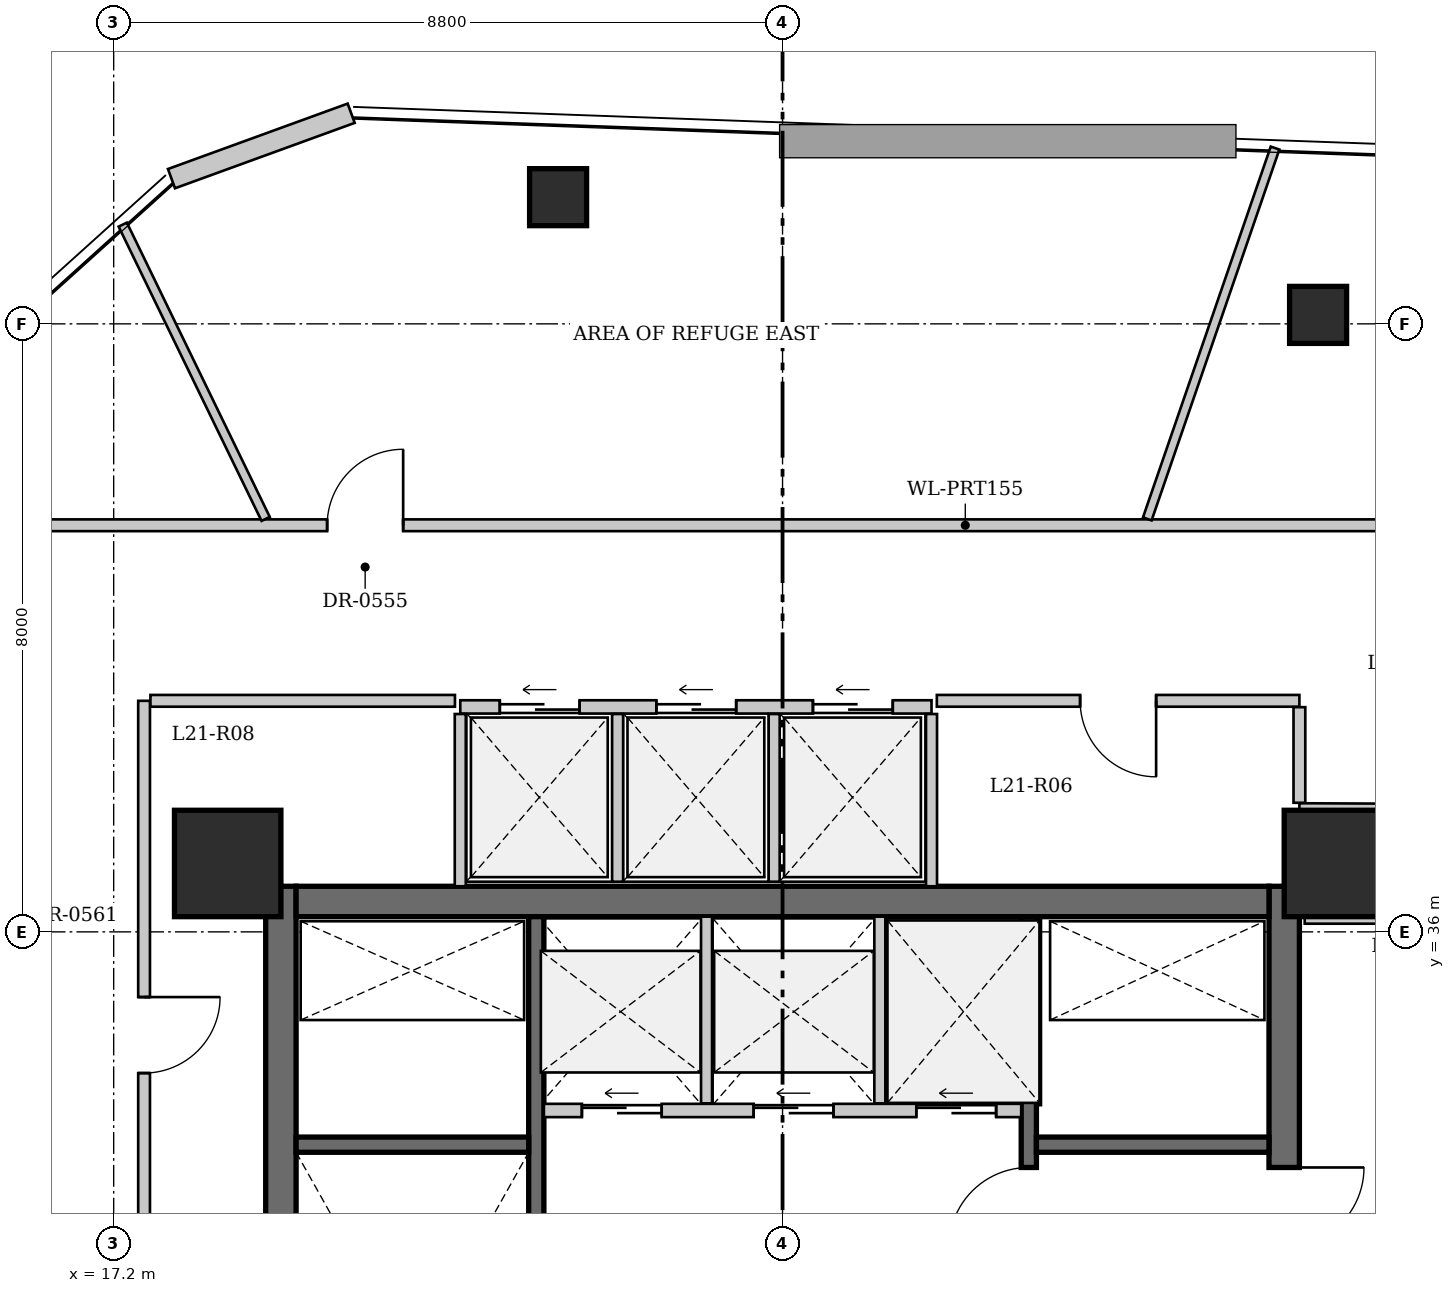
"""IFC4 building model, lengths in metres.
Left out: names, types, materials, properties, quantities, classifications, styles, units other than length and angle.
Written with IfcOpenShell. Run it as: python <this file> out.ifc"""

import sys

from ifc_helpers import new_model, si_unit, direction, frame, frame_2d, origin, origin_2d, place, context, subcontext, project, spatial, rectangle, hollow_rectangle, extrude, source, transform, mapped, element, fill, save


model = new_model("IFC4")
c1 = context("Model", 3, precision=1e-05, world=origin(), true_north=direction((0.0, 1.0)))
c2 = subcontext(c1, "Body", "Model", "MODEL_VIEW")
j1 = project(units=[si_unit("LENGTHUNIT", "METRE"), si_unit("PLANEANGLEUNIT", "RADIAN")], contexts=[c1])
p1 = place(None, origin())
s1 = spatial("IfcSite", under=j1, at=p1, CompositionType="ELEMENT")
p2 = place(p1, origin())
s2 = spatial("IfcBuilding", under=s1, at=p2, CompositionType="ELEMENT")
p3 = place(p2, frame((0.0, 0.0, 84.8)))
s3 = spatial("IfcBuildingStorey", under=s2, at=p3, CompositionType="ELEMENT", Elevation=84.8)
for number, where, z_axis, x_axis in (
    (1, (23.047, 45.667, 0.0), (0.0, 0.0, 1.0), (1.0, 0.0, 0.0)),
    (2, (33.046, 44.118, 0.0), (0.0, 0.0, 1.0), (1.0, 0.0, 0.0)),
):
    element("IfcColumn", number, at=place(p3, frame(where, z_axis=z_axis, x_axis=x_axis)), inside=s3, PredefinedType="COLUMN", context=c2, shape_type="SweptSolid", body=[
        extrude(hollow_rectangle(XDim=0.75, YDim=0.75, WallThickness=0.04, at=origin_2d()), origin(), (0.0, 0.0, 1.0), 4.15),
    ])
for number, where, z_axis, x_axis in (
    (3, (33.3, 36.9, 0.0), (0.0, 0.0, 1.0), (1.0, 0.0, 0.0)),
    (4, (18.7, 36.9, 0.0), (0.0, 0.0, 1.0), (1.0, 0.0, 0.0)),
):
    element("IfcColumn", number, at=place(p3, frame(where, z_axis=z_axis, x_axis=x_axis)), inside=s3, PredefinedType="COLUMN", context=c2, shape_type="SweptSolid", body=[
        extrude(rectangle(XDim=1.4, YDim=1.4, at=origin_2d()), origin(), (0.0, 0.0, 1.0), 4.15),
    ])
p4 = place(p3, frame((17.96, 45.911, 0.0), z_axis=(0.0, 0.0, 1.0), x_axis=(0.939714067994, 0.341961211856, 0.0)))
e5 = element("IfcWall", 5, at=p4, inside=s3, PredefinedType="SOLIDWALL", context=c2, shape_type="SweptSolid", body=[
    extrude(rectangle(XDim=2.516, YDim=0.27, at=frame_2d((1.258, 0.0))), origin(), (0.0, 0.0, 1.0), 4.15),
])
p5 = place(p3, frame((19.4, 25.8, 0.0), z_axis=(0.0, 0.0, 1.0), x_axis=(0.0, 1.0, 0.0)))
e6 = element("IfcWall", 6, at=p5, inside=s3, PredefinedType="SHEAR", context=c2, shape_type="SweptSolid", body=[
    extrude(rectangle(XDim=10.8, YDim=0.4, at=frame_2d((5.4, 0.0))), origin(), (0.0, 0.0, 1.0), 4.6),
])
p6 = place(p3, frame((32.6, 36.6, 0.0), z_axis=(0.0, 0.0, 1.0), x_axis=(0.0, -1.0, 0.0)))
e7 = element("IfcWall", 7, at=p6, inside=s3, PredefinedType="SHEAR", context=c2, shape_type="SweptSolid", body=[
    extrude(rectangle(XDim=10.8, YDim=0.4, at=frame_2d((5.4, 0.0))), origin(), (0.0, 0.0, 1.0), 4.6),
])
p7 = place(p6, frame((3.7, 0.0, 0.0)))
e8 = element("IfcOpeningElement", 8, at=p7, cuts=e7, PredefinedType="OPENING", context=c2, shape_type="SweptSolid", body=[
    extrude(rectangle(XDim=1.05, YDim=2.15, at=frame_2d((0.525, 1.075))), frame((0.0, 0.21, 0.0), z_axis=(0.0, -1.0, 0.0), x_axis=(1.0, 0.0, 0.0)), (0.0, 0.0, 1.0), 0.42),
])
p8 = place(p3, frame((19.6, 36.4, 0.0), z_axis=(0.0, 0.0, 1.0), x_axis=(1.0, 0.0, 0.0)))
e9 = element("IfcWall", 9, at=p8, inside=s3, PredefinedType="SHEAR", context=c2, shape_type="SweptSolid", body=[
    extrude(rectangle(XDim=12.8, YDim=0.4, at=frame_2d((6.4, 0.0))), origin(), (0.0, 0.0, 1.0), 4.6),
])
p9 = place(p3, frame((22.76, 26.2, 0.0), z_axis=(0.0, 0.0, 1.0), x_axis=(0.0, 1.0, 0.0)))
e10 = element("IfcWall", 10, at=p9, inside=s3, PredefinedType="SHEAR", context=c2, shape_type="SweptSolid", body=[
    extrude(rectangle(XDim=10.0, YDim=0.2, at=frame_2d((5.0, 0.0))), origin(), (0.0, 0.0, 1.0), 4.6),
])
p10 = place(p3, frame((29.24, 26.2, 0.0), z_axis=(0.0, 0.0, 1.0), x_axis=(0.0, 1.0, 0.0)))
e11 = element("IfcWall", 11, at=p10, inside=s3, PredefinedType="SHEAR", context=c2, shape_type="SweptSolid", body=[
    extrude(rectangle(XDim=10.0, YDim=0.2, at=frame_2d((5.0, 0.0))), origin(), (0.0, 0.0, 1.0), 4.6),
])
p11 = place(p10, frame((5.65, 0.0, 0.0)))
e12 = element("IfcOpeningElement", 12, at=p11, cuts=e11, PredefinedType="OPENING", context=c2, shape_type="SweptSolid", body=[
    extrude(rectangle(XDim=1.05, YDim=2.15, at=frame_2d((0.525, 1.075))), frame((0.0, 0.11, 0.0), z_axis=(0.0, -1.0, 0.0), x_axis=(1.0, 0.0, 0.0)), (0.0, 0.0, 1.0), 0.22),
])
for number, where, z_axis, x_axis in (
    (13, (19.6, 33.2, 0.0), (0.0, 0.0, 1.0), (1.0, 0.0, 0.0)),
    (14, (29.34, 33.2, 0.0), (0.0, 0.0, 1.0), (1.0, 0.0, 0.0)),
):
    element("IfcWall", number, at=place(p3, frame(where, z_axis=z_axis, x_axis=x_axis)), inside=s3, PredefinedType="SHEAR", context=c2, shape_type="SweptSolid", body=[
        extrude(rectangle(XDim=3.06, YDim=0.2, at=frame_2d((1.53, 0.0))), origin(), (0.0, 0.0, 1.0), 4.6),
    ])
p12 = place(p3, frame((22.86, 33.65, 0.0), z_axis=(0.0, 0.0, 1.0), x_axis=(1.0, 0.0, 0.0)))
e15 = element("IfcWall", 15, at=p12, inside=s3, PredefinedType="SOLIDWALL", context=c2, shape_type="SweptSolid", body=[
    extrude(rectangle(XDim=6.28, YDim=0.175, at=frame_2d((3.14, 0.0))), origin(), (0.0, 0.0, 1.0), 4.15),
])
p13 = place(p12, frame((0.5, 0.0, 0.0)))
e16 = element("IfcOpeningElement", 16, at=p13, cuts=e15, PredefinedType="OPENING", context=c2, shape_type="SweptSolid", body=[
    extrude(rectangle(XDim=1.05, YDim=2.15, at=frame_2d((0.525, 1.075))), frame((0.0, 0.098, 0.0), z_axis=(0.0, -1.0, 0.0), x_axis=(1.0, 0.0, 0.0)), (0.0, 0.0, 1.0), 0.195),
])
p14 = place(p12, frame((2.76, 0.0, 0.0)))
e17 = element("IfcOpeningElement", 17, at=p14, cuts=e15, PredefinedType="OPENING", context=c2, shape_type="SweptSolid", body=[
    extrude(rectangle(XDim=1.05, YDim=2.15, at=frame_2d((0.525, 1.075))), frame((0.0, 0.098, 0.0), z_axis=(0.0, -1.0, 0.0), x_axis=(1.0, 0.0, 0.0)), (0.0, 0.0, 1.0), 0.195),
])
p15 = place(p12, frame((4.9, 0.0, 0.0)))
e18 = element("IfcOpeningElement", 18, at=p15, cuts=e15, PredefinedType="OPENING", context=c2, shape_type="SweptSolid", body=[
    extrude(rectangle(XDim=1.05, YDim=2.15, at=frame_2d((0.525, 1.075))), frame((0.0, 0.098, 0.0), z_axis=(0.0, -1.0, 0.0), x_axis=(1.0, 0.0, 0.0)), (0.0, 0.0, 1.0), 0.195),
])
for number, where, z_axis, x_axis in (
    (19, (25.0, 33.743, 0.0), (0.0, 0.0, 1.0), (0.0, 1.0, 0.0)),
    (20, (27.28, 33.743, 0.0), (0.0, 0.0, 1.0), (0.0, 1.0, 0.0)),
):
    element("IfcWall", number, at=place(p3, frame(where, z_axis=z_axis, x_axis=x_axis)), inside=s3, PredefinedType="SOLIDWALL", context=c2, shape_type="SweptSolid", body=[
        extrude(rectangle(XDim=2.457, YDim=0.145, at=frame_2d((1.228, 0.0))), origin(), (0.0, 0.0, 1.0), 4.15),
    ])
p16 = place(p3, frame((21.76, 38.96, 0.0), z_axis=(0.0, 0.0, 1.0), x_axis=(1.0, 0.0, 0.0)))
e21 = element("IfcWall", 21, at=p16, inside=s3, PredefinedType="SOLIDWALL", context=c2, shape_type="SweptSolid", body=[
    extrude(rectangle(XDim=6.2, YDim=0.175, at=frame_2d((3.1, 0.0))), origin(), (0.0, 0.0, 1.0), 4.15),
])
p17 = place(p16, frame((0.52, 0.0, 0.0)))
e22 = element("IfcOpeningElement", 22, at=p17, cuts=e21, PredefinedType="OPENING", context=c2, shape_type="SweptSolid", body=[
    extrude(rectangle(XDim=1.05, YDim=2.15, at=frame_2d((0.525, 1.075))), frame((0.0, 0.098, 0.0), z_axis=(0.0, -1.0, 0.0), x_axis=(1.0, 0.0, 0.0)), (0.0, 0.0, 1.0), 0.195),
])
p18 = place(p16, frame((2.58, 0.0, 0.0)))
e23 = element("IfcOpeningElement", 23, at=p18, cuts=e21, PredefinedType="OPENING", context=c2, shape_type="SweptSolid", body=[
    extrude(rectangle(XDim=1.05, YDim=2.15, at=frame_2d((0.525, 1.075))), frame((0.0, 0.098, 0.0), z_axis=(0.0, -1.0, 0.0), x_axis=(1.0, 0.0, 0.0)), (0.0, 0.0, 1.0), 0.195),
])
p19 = place(p16, frame((4.64, 0.0, 0.0)))
e24 = element("IfcOpeningElement", 24, at=p19, cuts=e21, PredefinedType="OPENING", context=c2, shape_type="SweptSolid", body=[
    extrude(rectangle(XDim=1.05, YDim=2.15, at=frame_2d((0.525, 1.075))), frame((0.0, 0.098, 0.0), z_axis=(0.0, -1.0, 0.0), x_axis=(1.0, 0.0, 0.0)), (0.0, 0.0, 1.0), 0.195),
])
for number, where, z_axis, x_axis in (
    (25, (21.76, 36.6, 0.0), (0.0, 0.0, 1.0), (0.0, 1.0, 0.0)),
    (26, (27.96, 36.6, 0.0), (0.0, 0.0, 1.0), (0.0, 1.0, 0.0)),
):
    element("IfcWall", number, at=place(p3, frame(where, z_axis=z_axis, x_axis=x_axis)), inside=s3, PredefinedType="SOLIDWALL", context=c2, shape_type="SweptSolid", body=[
        extrude(rectangle(XDim=2.266, YDim=0.145, at=frame_2d((1.133, 0.0))), origin(), (0.0, 0.0, 1.0), 4.15),
    ])
for number, where, z_axis, x_axis in (
    (27, (23.83, 36.66, 0.0), (0.0, 0.0, 1.0), (0.0, 1.0, 0.0)),
    (28, (25.89, 36.66, 0.0), (0.0, 0.0, 1.0), (0.0, 1.0, 0.0)),
):
    element("IfcWall", number, at=place(p3, frame(where, z_axis=z_axis, x_axis=x_axis)), inside=s3, PredefinedType="SOLIDWALL", context=c2, shape_type="SweptSolid", body=[
        extrude(rectangle(XDim=2.207, YDim=0.145, at=frame_2d((1.103, 0.0))), origin(), (0.0, 0.0, 1.0), 4.15),
    ])
p20 = place(p3, frame((15.2, 41.35, 0.0), z_axis=(0.0, 0.0, 1.0), x_axis=(1.0, 0.0, 0.0)))
e29 = element("IfcWall", 29, at=p20, inside=s3, PredefinedType="PARTITIONING", context=c2, shape_type="SweptSolid", body=[
    extrude(rectangle(XDim=20.6, YDim=0.155, at=frame_2d((10.3, 0.0))), origin(), (0.0, 0.0, 1.0), 4.15),
])
p21 = place(p20, frame((4.809, 0.0, 0.0)))
e30 = element("IfcOpeningElement", 30, at=p21, cuts=e29, PredefinedType="OPENING", context=c2, shape_type="SweptSolid", body=[
    extrude(rectangle(XDim=1.0, YDim=2.15, at=frame_2d((0.5, 1.075))), frame((0.0, 0.087, 0.0), z_axis=(0.0, -1.0, 0.0), x_axis=(1.0, 0.0, 0.0)), (0.0, 0.0, 1.0), 0.175),
])
p22 = place(p3, frame((32.8, 39.04, 0.0), z_axis=(0.0, 0.0, 1.0), x_axis=(-1.0, 0.0, 0.0)))
e31 = element("IfcWall", 31, at=p22, inside=s3, PredefinedType="PARTITIONING", context=c2, shape_type="SweptSolid", body=[
    extrude(rectangle(XDim=4.77, YDim=0.155, at=frame_2d((2.385, 0.0))), origin(), (0.0, 0.0, 1.0), 4.15),
])
p23 = place(p22, frame((1.885, 0.0, 0.0)))
e32 = element("IfcOpeningElement", 32, at=p23, cuts=e31, PredefinedType="OPENING", context=c2, shape_type="SweptSolid", body=[
    extrude(rectangle(XDim=1.0, YDim=2.15, at=frame_2d((0.5, 1.075))), frame((0.0, 0.087, 0.0), z_axis=(0.0, -1.0, 0.0), x_axis=(1.0, 0.0, 0.0)), (0.0, 0.0, 1.0), 0.175),
])
p24 = place(p3, frame((17.6, 39.04, 0.0), z_axis=(0.0, 0.0, 1.0), x_axis=(0.0, -1.0, 0.0)))
e33 = element("IfcWall", 33, at=p24, inside=s3, PredefinedType="PARTITIONING", context=c2, shape_type="SweptSolid", body=[
    extrude(rectangle(XDim=13.24, YDim=0.155, at=frame_2d((6.62, 0.0))), origin(), (0.0, 0.0, 1.0), 4.15),
])
p25 = place(p24, frame((3.898, 0.0, 0.0)))
e34 = element("IfcOpeningElement", 34, at=p25, cuts=e33, PredefinedType="OPENING", context=c2, shape_type="SweptSolid", body=[
    extrude(rectangle(XDim=1.0, YDim=2.15, at=frame_2d((0.5, 1.075))), frame((0.0, 0.087, 0.0), z_axis=(0.0, -1.0, 0.0), x_axis=(1.0, 0.0, 0.0)), (0.0, 0.0, 1.0), 0.175),
])
p26 = place(p24, frame((10.374, 0.0, 0.0)))
e35 = element("IfcOpeningElement", 35, at=p26, cuts=e33, PredefinedType="OPENING", context=c2, shape_type="SweptSolid", body=[
    extrude(rectangle(XDim=1.0, YDim=2.15, at=frame_2d((0.5, 1.075))), frame((0.0, 0.087, 0.0), z_axis=(0.0, -1.0, 0.0), x_axis=(1.0, 0.0, 0.0)), (0.0, 0.0, 1.0), 0.175),
])
p27 = place(p3, frame((33.928, 37.61, 0.0), z_axis=(0.0, 0.0, 1.0), x_axis=(-0.999989669582, 0.004545407589, 0.0)))
e36 = element("IfcWall", 36, at=p27, inside=s3, PredefinedType="PARTITIONING", context=c2, shape_type="SweptSolid", body=[
    extrude(rectangle(XDim=1.128, YDim=0.155, at=frame_2d((0.564, 0.0))), origin(), (0.0, 0.0, 1.0), 2.725),
])
p28 = place(p3, frame((32.8, 37.698, 0.0), z_axis=(0.0, 0.0, 1.0), x_axis=(0.0, 1.0, 0.0)))
e37 = element("IfcWall", 37, at=p28, inside=s3, PredefinedType="PARTITIONING", context=c2, shape_type="SweptSolid", body=[
    extrude(rectangle(XDim=1.258, YDim=0.155, at=frame_2d((0.629, 0.0))), origin(), (0.0, 0.0, 1.0), 3.712),
])
p29 = place(p3, frame((21.69, 39.04, 0.0), z_axis=(0.0, 0.0, 1.0), x_axis=(-1.0, 0.0, 0.0)))
e38 = element("IfcWall", 38, at=p29, inside=s3, PredefinedType="PARTITIONING", context=c2, shape_type="SweptSolid", body=[
    extrude(rectangle(XDim=4.006, YDim=0.155, at=frame_2d((2.003, 0.0))), origin(), (0.0, 0.0, 1.0), 4.15),
])
p30 = place(p3, frame((32.87, 36.185, 0.0), z_axis=(0.0, 0.0, 1.0), x_axis=(1.0, 0.0, 0.0)))
e39 = element("IfcWall", 39, at=p30, inside=s3, PredefinedType="PARTITIONING", context=c2, shape_type="SweptSolid", body=[
    extrude(rectangle(XDim=1.046, YDim=0.155, at=frame_2d((0.523, 0.0))), origin(), (0.0, 0.0, 1.0), 2.725),
])
p31 = place(p3, frame((30.799, 41.434, 0.0), z_axis=(0.0, 0.0, 1.0), x_axis=(0.32567865408, 0.945480520305, 0.0)))
e40 = element("IfcWall", 40, at=p31, inside=s3, PredefinedType="PARTITIONING", context=c2, shape_type="SweptSolid", body=[
    extrude(rectangle(XDim=5.16, YDim=0.12, at=frame_2d((2.58, 0.0))), origin(), (0.0, 0.0, 1.0), 4.15),
])
p32 = place(p3, frame((19.199, 41.434, 0.0), z_axis=(0.0, 0.0, 1.0), x_axis=(-0.436746607689, 0.899584571162, 0.0)))
e41 = element("IfcWall", 41, at=p32, inside=s3, PredefinedType="PARTITIONING", context=c2, shape_type="SweptSolid", body=[
    extrude(rectangle(XDim=4.304, YDim=0.12, at=frame_2d((2.152, 0.0))), origin(), (0.0, 0.0, 1.0), 4.15),
])
m1 = source(origin(), c2, "Body", "SweptSolid", [
    extrude(rectangle(XDim=1.05, YDim=2.15, at=frame_2d((0.525, 1.075))), frame((0.0, 0.025, 0.0), z_axis=(0.0, -1.0, 0.0), x_axis=(1.0, 0.0, 0.0)), (0.0, 0.0, 1.0), 0.05),
])
p33 = place(p7, origin())
e42 = element("IfcDoor", 42, at=p33, inside=s3, OperationType="SINGLE_SWING_LEFT", PredefinedType="DOOR", context=c2, shape_type="MappedRepresentation", body=[
    mapped(m1, transform((0.0, 0.0, 0.0), x_axis=(1.0, 0.0, 0.0), y_axis=(0.0, 1.0, 0.0), z_axis=(0.0, 0.0, 1.0), scale=1.0)),
])
fill(e8, e42)
p34 = place(p11, origin())
e43 = element("IfcDoor", 43, at=p34, inside=s3, OperationType="SINGLE_SWING_LEFT", PredefinedType="DOOR", context=c2, shape_type="MappedRepresentation", body=[
    mapped(m1, transform((0.0, 0.0, 0.0), x_axis=(1.0, 0.0, 0.0), y_axis=(0.0, 1.0, 0.0), z_axis=(0.0, 0.0, 1.0), scale=1.0)),
])
fill(e12, e43)
m2 = source(origin(), c2, "Body", "SweptSolid", [
    extrude(rectangle(XDim=1.05, YDim=2.15, at=frame_2d((0.525, 1.075))), frame((0.0, 0.025, 0.0), z_axis=(0.0, -1.0, 0.0), x_axis=(1.0, 0.0, 0.0)), (0.0, 0.0, 1.0), 0.05),
])
p35 = place(p13, origin())
e44 = element("IfcDoor", 44, at=p35, inside=s3, OperationType="SLIDING_TO_LEFT", PredefinedType="DOOR", context=c2, shape_type="MappedRepresentation", body=[
    mapped(m2, transform((0.0, 0.0, 0.0), x_axis=(1.0, 0.0, 0.0), y_axis=(0.0, 1.0, 0.0), z_axis=(0.0, 0.0, 1.0), scale=1.0)),
])
fill(e16, e44)
p36 = place(p14, origin())
e45 = element("IfcDoor", 45, at=p36, inside=s3, OperationType="SLIDING_TO_LEFT", PredefinedType="DOOR", context=c2, shape_type="MappedRepresentation", body=[
    mapped(m2, transform((0.0, 0.0, 0.0), x_axis=(1.0, 0.0, 0.0), y_axis=(0.0, 1.0, 0.0), z_axis=(0.0, 0.0, 1.0), scale=1.0)),
])
fill(e17, e45)
p37 = place(p15, origin())
e46 = element("IfcDoor", 46, at=p37, inside=s3, OperationType="SLIDING_TO_LEFT", PredefinedType="DOOR", context=c2, shape_type="MappedRepresentation", body=[
    mapped(m2, transform((0.0, 0.0, 0.0), x_axis=(1.0, 0.0, 0.0), y_axis=(0.0, 1.0, 0.0), z_axis=(0.0, 0.0, 1.0), scale=1.0)),
])
fill(e18, e46)
p38 = place(p17, origin())
e47 = element("IfcDoor", 47, at=p38, inside=s3, OperationType="SLIDING_TO_LEFT", PredefinedType="DOOR", context=c2, shape_type="MappedRepresentation", body=[
    mapped(m2, transform((0.0, 0.0, 0.0), x_axis=(1.0, 0.0, 0.0), y_axis=(0.0, 1.0, 0.0), z_axis=(0.0, 0.0, 1.0), scale=1.0)),
])
fill(e22, e47)
p39 = place(p18, origin())
e48 = element("IfcDoor", 48, at=p39, inside=s3, OperationType="SLIDING_TO_LEFT", PredefinedType="DOOR", context=c2, shape_type="MappedRepresentation", body=[
    mapped(m2, transform((0.0, 0.0, 0.0), x_axis=(1.0, 0.0, 0.0), y_axis=(0.0, 1.0, 0.0), z_axis=(0.0, 0.0, 1.0), scale=1.0)),
])
fill(e23, e48)
p40 = place(p19, origin())
e49 = element("IfcDoor", 49, at=p40, inside=s3, OperationType="SLIDING_TO_LEFT", PredefinedType="DOOR", context=c2, shape_type="MappedRepresentation", body=[
    mapped(m2, transform((0.0, 0.0, 0.0), x_axis=(1.0, 0.0, 0.0), y_axis=(0.0, 1.0, 0.0), z_axis=(0.0, 0.0, 1.0), scale=1.0)),
])
fill(e24, e49)
m3 = source(origin(), c2, "Body", "SweptSolid", [
    extrude(rectangle(XDim=1.0, YDim=2.15, at=frame_2d((0.5, 1.075))), frame((0.0, 0.025, 0.0), z_axis=(0.0, -1.0, 0.0), x_axis=(1.0, 0.0, 0.0)), (0.0, 0.0, 1.0), 0.05),
])
p41 = place(p21, origin())
e50 = element("IfcDoor", 50, at=p41, inside=s3, OperationType="SINGLE_SWING_RIGHT", PredefinedType="DOOR", context=c2, shape_type="MappedRepresentation", body=[
    mapped(m3, transform((0.0, 0.0, 0.0), x_axis=(1.0, 0.0, 0.0), y_axis=(0.0, 1.0, 0.0), z_axis=(0.0, 0.0, 1.0), scale=1.0)),
])
fill(e30, e50)
p42 = place(p23, origin())
e51 = element("IfcDoor", 51, at=p42, inside=s3, OperationType="SINGLE_SWING_LEFT", PredefinedType="DOOR", context=c2, shape_type="MappedRepresentation", body=[
    mapped(m3, transform((0.0, 0.0, 0.0), x_axis=(1.0, 0.0, 0.0), y_axis=(0.0, 1.0, 0.0), z_axis=(0.0, 0.0, 1.0), scale=1.0)),
])
fill(e32, e51)
p43 = place(p25, origin())
e52 = element("IfcDoor", 52, at=p43, inside=s3, OperationType="SINGLE_SWING_LEFT", PredefinedType="DOOR", context=c2, shape_type="MappedRepresentation", body=[
    mapped(m3, transform((0.0, 0.0, 0.0), x_axis=(1.0, 0.0, 0.0), y_axis=(0.0, 1.0, 0.0), z_axis=(0.0, 0.0, 1.0), scale=1.0)),
])
fill(e34, e52)
save(model, sys.argv[1])
